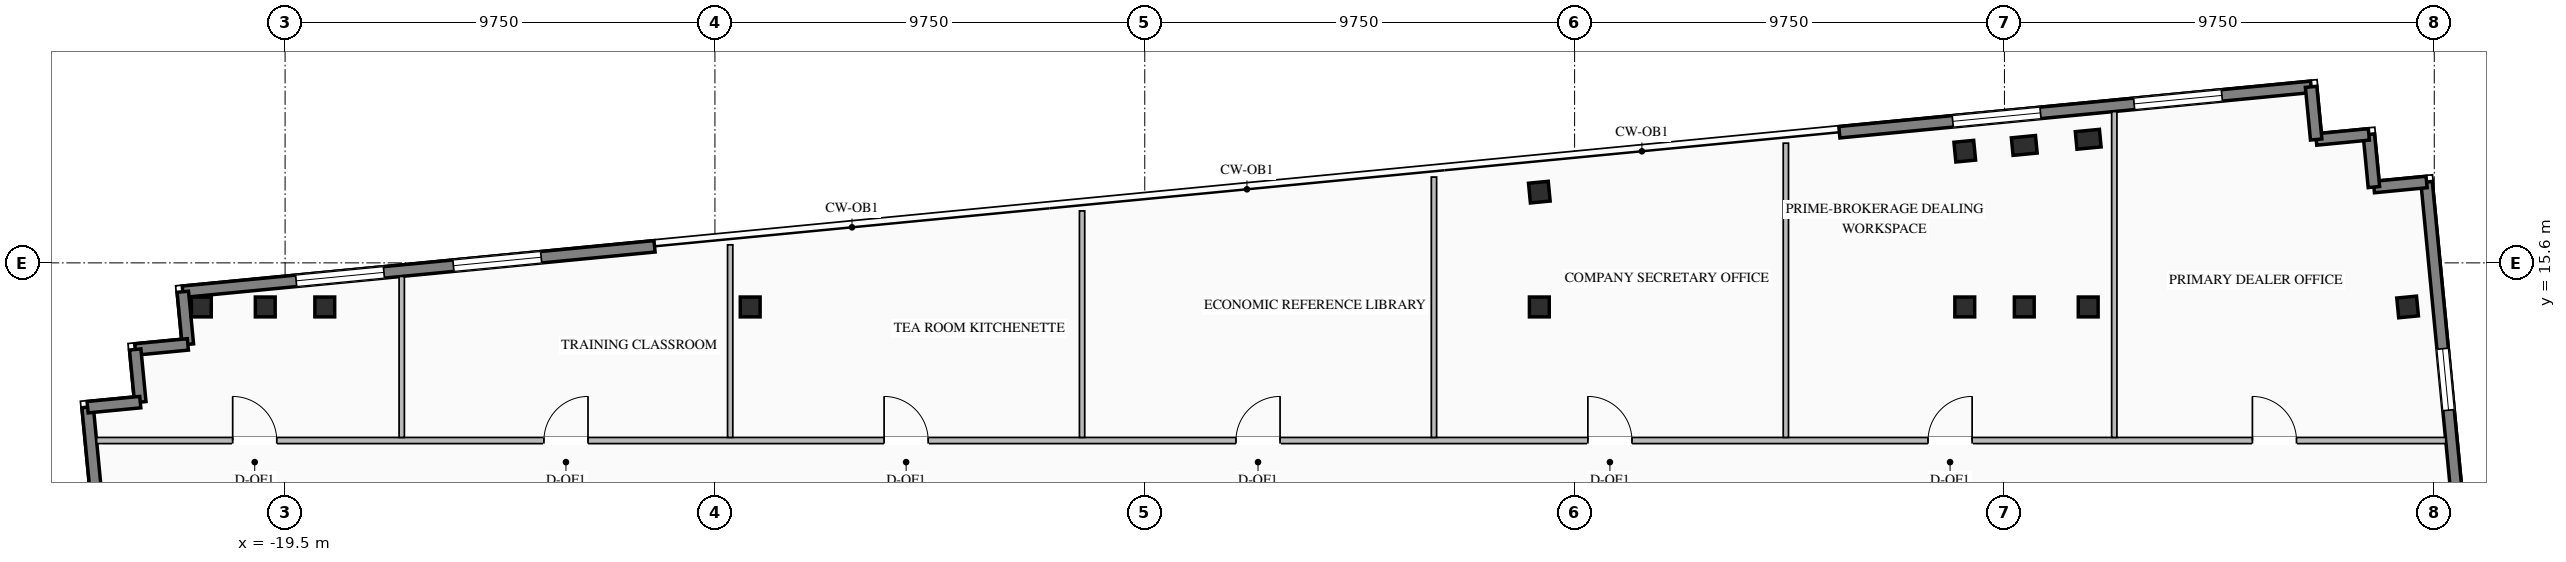
"""IFC4 building model, lengths in metres.
Left out: names, types, materials, properties, quantities, classifications, styles, units other than length and angle.
Written with IfcOpenShell. Run it as: python <this file> out.ifc"""

import sys

from ifc_helpers import new_model, si_unit, direction, frame, frame_2d, origin, origin_2d, place, context, subcontext, project, spatial, rectangle, i_section, extrude, element, fill, save


model = new_model("IFC4")
c1 = context("Model", 3, precision=1e-05, world=origin(), true_north=direction((0.0, 1.0)))
c2 = subcontext(c1, "Body", "Model", "MODEL_VIEW")
j1 = project(units=[si_unit("LENGTHUNIT", "METRE"), si_unit("PLANEANGLEUNIT", "RADIAN")], contexts=[c1])
p1 = place(None, origin())
s1 = spatial("IfcSite", under=j1, at=p1, CompositionType="ELEMENT")
p2 = place(p1, origin())
s2 = spatial("IfcBuilding", under=s1, at=p2, CompositionType="ELEMENT")
p3 = place(p2, frame((0.0, 0.0, 279.3)))
s3 = spatial("IfcBuildingStorey", under=s2, at=p3, CompositionType="ELEMENT", Elevation=279.3)
for number, where, z_axis, x_axis in (
    (1, (-21.4, 14.6, 0.0), (0.0, 0.0, 1.0), (1.0, 0.0, 0.0)),
    (2, (-19.95, 14.6, 0.0), (0.0, 0.0, 1.0), (1.0, 0.0, 0.0)),
    (3, (-18.6, 14.6, 0.0), (0.0, 0.0, 1.0), (1.0, 0.0, 0.0)),
    (4, (-8.95, 14.6, 0.0), (0.0, 0.0, 1.0), (1.0, 0.0, 0.0)),
    (5, (8.95, 14.6, 0.0), (0.0, 0.0, 1.0), (1.0, 0.0, 0.0)),
    (6, (18.6, 14.6, 0.0), (0.0, 0.0, 1.0), (1.0, 0.0, 0.0)),
    (7, (19.95, 14.6, 0.0), (0.0, 0.0, 1.0), (1.0, 0.0, 0.0)),
    (8, (21.4, 14.6, 0.0), (0.0, 0.0, 1.0), (1.0, 0.0, 0.0)),
    (9, (8.95, 17.205, 0.0), (0.0, 0.0, 1.0), (0.995, 0.096, 0.0)),
    (10, (18.6, 18.134, 0.0), (0.0, 0.0, 1.0), (0.995, 0.096, 0.0)),
    (11, (28.645, 14.6, 0.0), (0.0, 0.0, 1.0), (0.995, 0.096, 0.0)),
):
    element("IfcColumn", number, at=place(p3, frame(where, z_axis=z_axis, x_axis=x_axis)), inside=s3, PredefinedType="COLUMN", context=c2, shape_type="SweptSolid", body=[
        extrude(i_section(OverallWidth=0.45, OverallDepth=0.45, WebThickness=0.022, FlangeThickness=0.032, at=origin_2d()), origin(), (0.0, 0.0, 1.0), 3.45),
    ])
for number, where, z_axis, x_axis in (
    (12, (19.95, 18.264, 0.0), (0.0, 0.0, 1.0), (0.995, 0.096, 0.0)),
    (13, (21.4, 18.403, 0.0), (0.0, 0.0, 1.0), (0.995, 0.096, 0.0)),
):
    element("IfcColumn", number, at=place(p3, frame(where, z_axis=z_axis, x_axis=x_axis)), inside=s3, PredefinedType="PILASTER", context=c2, shape_type="SweptSolid", body=[
        extrude(rectangle(XDim=0.55, YDim=0.4, at=origin_2d()), origin(), (0.0, 0.0, 1.0), 3.45),
    ])
p4 = place(p3, frame((-21.821, 14.945, 0.0), z_axis=(0.0, 0.0, 1.0), x_axis=(0.995394787719, 0.095860401528, 0.0)))
e14 = element("IfcWall", 14, at=p4, inside=s3, PredefinedType="STANDARD", context=c2, shape_type="SweptSolid", body=[
    extrude(rectangle(XDim=10.75, YDim=0.26, at=frame_2d((5.375, 0.0))), origin(), (0.0, 0.0, 1.0), 3.25),
])
p5 = place(p4, frame((2.583, 0.0, 0.76)))
e15 = element("IfcOpeningElement", 15, at=p5, cuts=e14, PredefinedType="OPENING", context=c2, shape_type="SweptSolid", body=[
    extrude(rectangle(XDim=2.0, YDim=2.05, at=frame_2d((1.0, 1.025))), frame((0.0, 0.14, 0.0), z_axis=(0.0, -1.0, 0.0), x_axis=(1.0, 0.0, 0.0)), (0.0, 0.0, 1.0), 0.28),
])
p6 = place(p4, frame((6.167, 0.0, 0.76)))
e16 = element("IfcOpeningElement", 16, at=p6, cuts=e14, PredefinedType="OPENING", context=c2, shape_type="SweptSolid", body=[
    extrude(rectangle(XDim=2.0, YDim=2.05, at=frame_2d((1.0, 1.025))), frame((0.0, 0.14, 0.0), z_axis=(0.0, -1.0, 0.0), x_axis=(1.0, 0.0, 0.0)), (0.0, 0.0, 1.0), 0.28),
])
p7 = place(p3, frame((15.756, 18.563, 0.0), z_axis=(0.0, 0.0, 1.0), x_axis=(0.995396745868, 0.095840066339, 0.0)))
e17 = element("IfcWall", 17, at=p7, inside=s3, PredefinedType="STANDARD", context=c2, shape_type="SweptSolid", body=[
    extrude(rectangle(XDim=10.75, YDim=0.26, at=frame_2d((5.375, 0.0))), origin(), (0.0, 0.0, 1.0), 3.25),
])
p8 = place(p7, frame((2.583, 0.0, 0.76)))
e18 = element("IfcOpeningElement", 18, at=p8, cuts=e17, PredefinedType="OPENING", context=c2, shape_type="SweptSolid", body=[
    extrude(rectangle(XDim=2.0, YDim=2.05, at=frame_2d((1.0, 1.025))), frame((0.0, 0.14, 0.0), z_axis=(0.0, -1.0, 0.0), x_axis=(1.0, 0.0, 0.0)), (0.0, 0.0, 1.0), 0.28),
])
p9 = place(p7, frame((6.717, 0.0, 0.76)))
e19 = element("IfcOpeningElement", 19, at=p9, cuts=e17, PredefinedType="OPENING", context=c2, shape_type="SweptSolid", body=[
    extrude(rectangle(XDim=2.0, YDim=2.05, at=frame_2d((1.0, 1.025))), frame((0.0, 0.14, 0.0), z_axis=(0.0, -1.0, 0.0), x_axis=(1.0, 0.0, 0.0)), (0.0, 0.0, 1.0), 0.28),
])
p10 = place(p3, frame((-22.527, -2.754, 0.0), z_axis=(0.0, 0.0, 1.0), x_axis=(-0.095850890337, 0.995395703638, 0.0)))
e20 = element("IfcWall", 20, at=p10, inside=s3, PredefinedType="STANDARD", context=c2, shape_type="SweptSolid", body=[
    extrude(rectangle(XDim=15.15, YDim=0.26, at=frame_2d((7.575, 0.0))), origin(), (0.0, 0.0, 1.0), 3.25),
])
p11 = place(p10, frame((3.3, 0.0, 0.76)))
e21 = element("IfcOpeningElement", 21, at=p11, cuts=e20, PredefinedType="OPENING", context=c2, shape_type="SweptSolid", body=[
    extrude(rectangle(XDim=1.4, YDim=1.95, at=frame_2d((0.7, 0.975))), frame((0.0, 0.14, 0.0), z_axis=(0.0, -1.0, 0.0), x_axis=(1.0, 0.0, 0.0)), (0.0, 0.0, 1.0), 0.28),
])
p12 = place(p10, frame((9.4, 0.0, 0.76)))
e22 = element("IfcOpeningElement", 22, at=p12, cuts=e20, PredefinedType="OPENING", context=c2, shape_type="SweptSolid", body=[
    extrude(rectangle(XDim=1.4, YDim=1.95, at=frame_2d((0.7, 0.975))), frame((0.0, 0.14, 0.0), z_axis=(0.0, -1.0, 0.0), x_axis=(1.0, 0.0, 0.0)), (0.0, 0.0, 1.0), 0.28),
])
p13 = place(p3, frame((29.075, 17.435, 0.0), z_axis=(0.0, 0.0, 1.0), x_axis=(0.095850890337, -0.995395703638, 0.0)))
e23 = element("IfcWall", 23, at=p13, inside=s3, PredefinedType="STANDARD", context=c2, shape_type="SweptSolid", body=[
    extrude(rectangle(XDim=15.15, YDim=0.26, at=frame_2d((7.575, 0.0))), origin(), (0.0, 0.0, 1.0), 3.25),
])
p14 = place(p13, frame((3.8, 0.0, 0.76)))
e24 = element("IfcOpeningElement", 24, at=p14, cuts=e23, PredefinedType="OPENING", context=c2, shape_type="SweptSolid", body=[
    extrude(rectangle(XDim=1.4, YDim=1.95, at=frame_2d((0.7, 0.975))), frame((0.0, 0.14, 0.0), z_axis=(0.0, -1.0, 0.0), x_axis=(1.0, 0.0, 0.0)), (0.0, 0.0, 1.0), 0.28),
])
p15 = place(p13, frame((9.4, 0.0, 0.76)))
e25 = element("IfcOpeningElement", 25, at=p15, cuts=e23, PredefinedType="OPENING", context=c2, shape_type="SweptSolid", body=[
    extrude(rectangle(XDim=1.4, YDim=1.95, at=frame_2d((0.7, 0.975))), frame((0.0, 0.14, 0.0), z_axis=(0.0, -1.0, 0.0), x_axis=(1.0, 0.0, 0.0)), (0.0, 0.0, 1.0), 0.28),
])
for number, where, z_axis, x_axis in (
    (26, (29.075, 17.435, 0.0), (0.0, 0.0, 1.0), (-0.995, -0.096, 0.0)),
    (27, (27.881, 17.32, 0.0), (0.0, 0.0, 1.0), (-0.096, 0.995, 0.0)),
):
    element("IfcWall", number, at=place(p3, frame(where, z_axis=z_axis, x_axis=x_axis)), inside=s3, PredefinedType="STANDARD", context=c2, shape_type="SweptSolid", body=[
        extrude(rectangle(XDim=1.2, YDim=0.26, at=frame_2d((0.6, 0.0))), origin(), (0.0, 0.0, 1.0), 3.25),
    ])
for number, where, z_axis, x_axis in (
    (28, (27.766, 18.514, 0.0), (0.0, 0.0, 1.0), (-0.995, -0.096, 0.0)),
    (29, (26.571, 18.399, 0.0), (0.0, 0.0, 1.0), (-0.096, 0.995, 0.0)),
):
    element("IfcWall", number, at=place(p3, frame(where, z_axis=z_axis, x_axis=x_axis)), inside=s3, PredefinedType="STANDARD", context=c2, shape_type="SweptSolid", body=[
        extrude(rectangle(XDim=1.2, YDim=0.26, at=frame_2d((0.6, 0.0))), origin(), (0.0, 0.0, 1.0), 3.25),
    ])
p16 = place(p3, frame((-21.821, 14.945, 0.0), z_axis=(0.0, 0.0, 1.0), x_axis=(0.096038073607, -0.995377661201, 0.0)))
e30 = element("IfcWall", 30, at=p16, inside=s3, PredefinedType="STANDARD", context=c2, shape_type="SweptSolid", body=[
    extrude(rectangle(XDim=1.2, YDim=0.26, at=frame_2d((0.6, 0.0))), origin(), (0.0, 0.0, 1.0), 2.565),
])
for number, where, z_axis, x_axis in (
    (31, (-21.705, 13.75, 0.0), (0.0, 0.0, 1.0), (-0.995, -0.096, 0.0)),
    (32, (-22.9, 13.635, 0.0), (0.0, 0.0, 1.0), (0.096, -0.995, 0.0)),
    (33, (-22.785, 12.441, 0.0), (0.0, 0.0, 1.0), (-0.995, -0.096, 0.0)),
):
    element("IfcWall", number, at=place(p3, frame(where, z_axis=z_axis, x_axis=x_axis)), inside=s3, PredefinedType="STANDARD", context=c2, shape_type="SweptSolid", body=[
        extrude(rectangle(XDim=1.2, YDim=0.26, at=frame_2d((0.6, 0.0))), origin(), (0.0, 0.0, 1.0), 2.565),
    ])
p17 = place(p3, frame((-23.776, 11.57, 0.0), z_axis=(0.0, 0.0, 1.0), x_axis=(1.0, 0.0, 0.0)))
e34 = element("IfcWall", 34, at=p17, inside=s3, PredefinedType="STANDARD", context=c2, shape_type="SweptSolid", body=[
    extrude(rectangle(XDim=53.285, YDim=0.14, at=frame_2d((26.643, 0.0))), origin(), (0.0, 0.0, 1.0), 2.845),
])
p18 = place(p17, frame((3.087, 0.0, 0.0)))
e35 = element("IfcOpeningElement", 35, at=p18, cuts=e34, PredefinedType="OPENING", context=c2, shape_type="SweptSolid", body=[
    extrude(rectangle(XDim=1.0, YDim=2.08, at=frame_2d((0.5, 1.04))), frame((0.0, 0.08, 0.0), z_axis=(0.0, -1.0, 0.0), x_axis=(1.0, 0.0, 0.0)), (0.0, 0.0, 1.0), 0.16),
])
p19 = place(p17, frame((10.147, 0.0, 0.0)))
e36 = element("IfcOpeningElement", 36, at=p19, cuts=e34, PredefinedType="OPENING", context=c2, shape_type="SweptSolid", body=[
    extrude(rectangle(XDim=1.0, YDim=2.08, at=frame_2d((0.5, 1.04))), frame((0.0, 0.08, 0.0), z_axis=(0.0, -1.0, 0.0), x_axis=(1.0, 0.0, 0.0)), (0.0, 0.0, 1.0), 0.16),
])
p20 = place(p17, frame((17.863, 0.0, 0.0)))
e37 = element("IfcOpeningElement", 37, at=p20, cuts=e34, PredefinedType="OPENING", context=c2, shape_type="SweptSolid", body=[
    extrude(rectangle(XDim=1.0, YDim=2.08, at=frame_2d((0.5, 1.04))), frame((0.0, 0.08, 0.0), z_axis=(0.0, -1.0, 0.0), x_axis=(1.0, 0.0, 0.0)), (0.0, 0.0, 1.0), 0.16),
])
p21 = place(p17, frame((25.845, 0.0, 0.0)))
e38 = element("IfcOpeningElement", 38, at=p21, cuts=e34, PredefinedType="OPENING", context=c2, shape_type="SweptSolid", body=[
    extrude(rectangle(XDim=1.0, YDim=2.08, at=frame_2d((0.5, 1.04))), frame((0.0, 0.08, 0.0), z_axis=(0.0, -1.0, 0.0), x_axis=(1.0, 0.0, 0.0)), (0.0, 0.0, 1.0), 0.16),
])
p22 = place(p17, frame((33.827, 0.0, 0.0)))
e39 = element("IfcOpeningElement", 39, at=p22, cuts=e34, PredefinedType="OPENING", context=c2, shape_type="SweptSolid", body=[
    extrude(rectangle(XDim=1.0, YDim=2.08, at=frame_2d((0.5, 1.04))), frame((0.0, 0.08, 0.0), z_axis=(0.0, -1.0, 0.0), x_axis=(1.0, 0.0, 0.0)), (0.0, 0.0, 1.0), 0.16),
])
p23 = place(p17, frame((41.543, 0.0, 0.0)))
e40 = element("IfcOpeningElement", 40, at=p23, cuts=e34, PredefinedType="OPENING", context=c2, shape_type="SweptSolid", body=[
    extrude(rectangle(XDim=1.0, YDim=2.08, at=frame_2d((0.5, 1.04))), frame((0.0, 0.08, 0.0), z_axis=(0.0, -1.0, 0.0), x_axis=(1.0, 0.0, 0.0)), (0.0, 0.0, 1.0), 0.16),
])
p24 = place(p17, frame((48.901, 0.0, 0.0)))
e41 = element("IfcOpeningElement", 41, at=p24, cuts=e34, PredefinedType="OPENING", context=c2, shape_type="SweptSolid", body=[
    extrude(rectangle(XDim=1.0, YDim=2.08, at=frame_2d((0.5, 1.04))), frame((0.0, 0.08, 0.0), z_axis=(0.0, -1.0, 0.0), x_axis=(1.0, 0.0, 0.0)), (0.0, 0.0, 1.0), 0.16),
])
p25 = place(p3, frame((-16.854, 11.64, 0.0), z_axis=(0.0, 0.0, 1.0), x_axis=(0.0, 1.0, 0.0)))
e42 = element("IfcWall", 42, at=p25, inside=s3, PredefinedType="STANDARD", context=c2, shape_type="SweptSolid", body=[
    extrude(rectangle(XDim=3.653, YDim=0.12, at=frame_2d((1.826, 0.0))), origin(), (0.0, 0.0, 1.0), 3.25),
])
p26 = place(p3, frame((-9.404, 11.64, 0.0), z_axis=(0.0, 0.0, 1.0), x_axis=(0.0, 1.0, 0.0)))
e43 = element("IfcWall", 43, at=p26, inside=s3, PredefinedType="STANDARD", context=c2, shape_type="SweptSolid", body=[
    extrude(rectangle(XDim=4.37, YDim=0.12, at=frame_2d((2.185, 0.0))), origin(), (0.0, 0.0, 1.0), 3.25),
])
p27 = place(p3, frame((-1.422, 11.64, 0.0), z_axis=(0.0, 0.0, 1.0), x_axis=(0.0, 1.0, 0.0)))
e44 = element("IfcWall", 44, at=p27, inside=s3, PredefinedType="STANDARD", context=c2, shape_type="SweptSolid", body=[
    extrude(rectangle(XDim=5.139, YDim=0.12, at=frame_2d((2.569, 0.0))), origin(), (0.0, 0.0, 1.0), 3.25),
])
p28 = place(p3, frame((6.56, 11.64, 0.0), z_axis=(0.0, 0.0, 1.0), x_axis=(0.0, 1.0, 0.0)))
e45 = element("IfcWall", 45, at=p28, inside=s3, PredefinedType="STANDARD", context=c2, shape_type="SweptSolid", body=[
    extrude(rectangle(XDim=5.907, YDim=0.12, at=frame_2d((2.954, 0.0))), origin(), (0.0, 0.0, 1.0), 3.25),
])
p29 = place(p3, frame((14.542, 11.64, 0.0), z_axis=(0.0, 0.0, 1.0), x_axis=(0.0, 1.0, 0.0)))
e46 = element("IfcWall", 46, at=p29, inside=s3, PredefinedType="STANDARD", context=c2, shape_type="SweptSolid", body=[
    extrude(rectangle(XDim=6.676, YDim=0.12, at=frame_2d((3.338, 0.0))), origin(), (0.0, 0.0, 1.0), 3.25),
])
p30 = place(p3, frame((21.992, 11.64, 0.0), z_axis=(0.0, 0.0, 1.0), x_axis=(0.0, 1.0, 0.0)))
e47 = element("IfcWall", 47, at=p30, inside=s3, PredefinedType="STANDARD", context=c2, shape_type="SweptSolid", body=[
    extrude(rectangle(XDim=7.393, YDim=0.12, at=frame_2d((3.697, 0.0))), origin(), (0.0, 0.0, 1.0), 3.25),
])
p31 = place(p5, origin())
e48 = element("IfcWindow", 48, at=p31, inside=s3, PartitioningType="DOUBLE_PANEL_VERTICAL", PredefinedType="WINDOW", context=c2, shape_type="SweptSolid", body=[
    extrude(rectangle(XDim=2.0, YDim=2.05, at=frame_2d((1.0, 1.025))), frame((0.0, 0.03, 0.0), z_axis=(0.0, -1.0, 0.0), x_axis=(1.0, 0.0, 0.0)), (0.0, 0.0, 1.0), 0.06),
])
fill(e15, e48)
p32 = place(p6, origin())
e49 = element("IfcWindow", 49, at=p32, inside=s3, PartitioningType="DOUBLE_PANEL_VERTICAL", PredefinedType="WINDOW", context=c2, shape_type="SweptSolid", body=[
    extrude(rectangle(XDim=2.0, YDim=2.05, at=frame_2d((1.0, 1.025))), frame((0.0, 0.03, 0.0), z_axis=(0.0, -1.0, 0.0), x_axis=(1.0, 0.0, 0.0)), (0.0, 0.0, 1.0), 0.06),
])
fill(e16, e49)
p33 = place(p8, origin())
e50 = element("IfcWindow", 50, at=p33, inside=s3, PartitioningType="DOUBLE_PANEL_VERTICAL", PredefinedType="WINDOW", context=c2, shape_type="SweptSolid", body=[
    extrude(rectangle(XDim=2.0, YDim=2.05, at=frame_2d((1.0, 1.025))), frame((0.0, 0.03, 0.0), z_axis=(0.0, -1.0, 0.0), x_axis=(1.0, 0.0, 0.0)), (0.0, 0.0, 1.0), 0.06),
])
fill(e18, e50)
p34 = place(p9, origin())
e51 = element("IfcWindow", 51, at=p34, inside=s3, PartitioningType="DOUBLE_PANEL_VERTICAL", PredefinedType="WINDOW", context=c2, shape_type="SweptSolid", body=[
    extrude(rectangle(XDim=2.0, YDim=2.05, at=frame_2d((1.0, 1.025))), frame((0.0, 0.03, 0.0), z_axis=(0.0, -1.0, 0.0), x_axis=(1.0, 0.0, 0.0)), (0.0, 0.0, 1.0), 0.06),
])
fill(e19, e51)
p35 = place(p14, origin())
e52 = element("IfcWindow", 52, at=p35, inside=s3, PartitioningType="SINGLE_PANEL", PredefinedType="WINDOW", context=c2, shape_type="SweptSolid", body=[
    extrude(rectangle(XDim=1.4, YDim=1.95, at=frame_2d((0.7, 0.975))), frame((0.0, 0.03, 0.0), z_axis=(0.0, -1.0, 0.0), x_axis=(1.0, 0.0, 0.0)), (0.0, 0.0, 1.0), 0.06),
])
fill(e24, e52)
p36 = place(p18, origin())
e53 = element("IfcDoor", 53, at=p36, inside=s3, OperationType="SINGLE_SWING_LEFT", PredefinedType="DOOR", context=c2, shape_type="SweptSolid", body=[
    extrude(rectangle(XDim=1.0, YDim=2.08, at=frame_2d((0.5, 1.04))), frame((0.0, 0.025, 0.0), z_axis=(0.0, -1.0, 0.0), x_axis=(1.0, 0.0, 0.0)), (0.0, 0.0, 1.0), 0.05),
])
fill(e35, e53)
p37 = place(p19, origin())
e54 = element("IfcDoor", 54, at=p37, inside=s3, OperationType="SINGLE_SWING_RIGHT", PredefinedType="DOOR", context=c2, shape_type="SweptSolid", body=[
    extrude(rectangle(XDim=1.0, YDim=2.08, at=frame_2d((0.5, 1.04))), frame((0.0, 0.025, 0.0), z_axis=(0.0, -1.0, 0.0), x_axis=(1.0, 0.0, 0.0)), (0.0, 0.0, 1.0), 0.05),
])
fill(e36, e54)
p38 = place(p20, origin())
e55 = element("IfcDoor", 55, at=p38, inside=s3, OperationType="SINGLE_SWING_LEFT", PredefinedType="DOOR", context=c2, shape_type="SweptSolid", body=[
    extrude(rectangle(XDim=1.0, YDim=2.08, at=frame_2d((0.5, 1.04))), frame((0.0, 0.025, 0.0), z_axis=(0.0, -1.0, 0.0), x_axis=(1.0, 0.0, 0.0)), (0.0, 0.0, 1.0), 0.05),
])
fill(e37, e55)
p39 = place(p21, origin())
e56 = element("IfcDoor", 56, at=p39, inside=s3, OperationType="SINGLE_SWING_RIGHT", PredefinedType="DOOR", context=c2, shape_type="SweptSolid", body=[
    extrude(rectangle(XDim=1.0, YDim=2.08, at=frame_2d((0.5, 1.04))), frame((0.0, 0.025, 0.0), z_axis=(0.0, -1.0, 0.0), x_axis=(1.0, 0.0, 0.0)), (0.0, 0.0, 1.0), 0.05),
])
fill(e38, e56)
p40 = place(p22, origin())
e57 = element("IfcDoor", 57, at=p40, inside=s3, OperationType="SINGLE_SWING_LEFT", PredefinedType="DOOR", context=c2, shape_type="SweptSolid", body=[
    extrude(rectangle(XDim=1.0, YDim=2.08, at=frame_2d((0.5, 1.04))), frame((0.0, 0.025, 0.0), z_axis=(0.0, -1.0, 0.0), x_axis=(1.0, 0.0, 0.0)), (0.0, 0.0, 1.0), 0.05),
])
fill(e39, e57)
p41 = place(p23, origin())
e58 = element("IfcDoor", 58, at=p41, inside=s3, OperationType="SINGLE_SWING_RIGHT", PredefinedType="DOOR", context=c2, shape_type="SweptSolid", body=[
    extrude(rectangle(XDim=1.0, YDim=2.08, at=frame_2d((0.5, 1.04))), frame((0.0, 0.025, 0.0), z_axis=(0.0, -1.0, 0.0), x_axis=(1.0, 0.0, 0.0)), (0.0, 0.0, 1.0), 0.05),
])
fill(e40, e58)
p42 = place(p24, origin())
e59 = element("IfcDoor", 59, at=p42, inside=s3, OperationType="SINGLE_SWING_LEFT", PredefinedType="DOOR", context=c2, shape_type="SweptSolid", body=[
    extrude(rectangle(XDim=1.0, YDim=2.08, at=frame_2d((0.5, 1.04))), frame((0.0, 0.025, 0.0), z_axis=(0.0, -1.0, 0.0), x_axis=(1.0, 0.0, 0.0)), (0.0, 0.0, 1.0), 0.05),
])
fill(e41, e59)
save(model, sys.argv[1])
